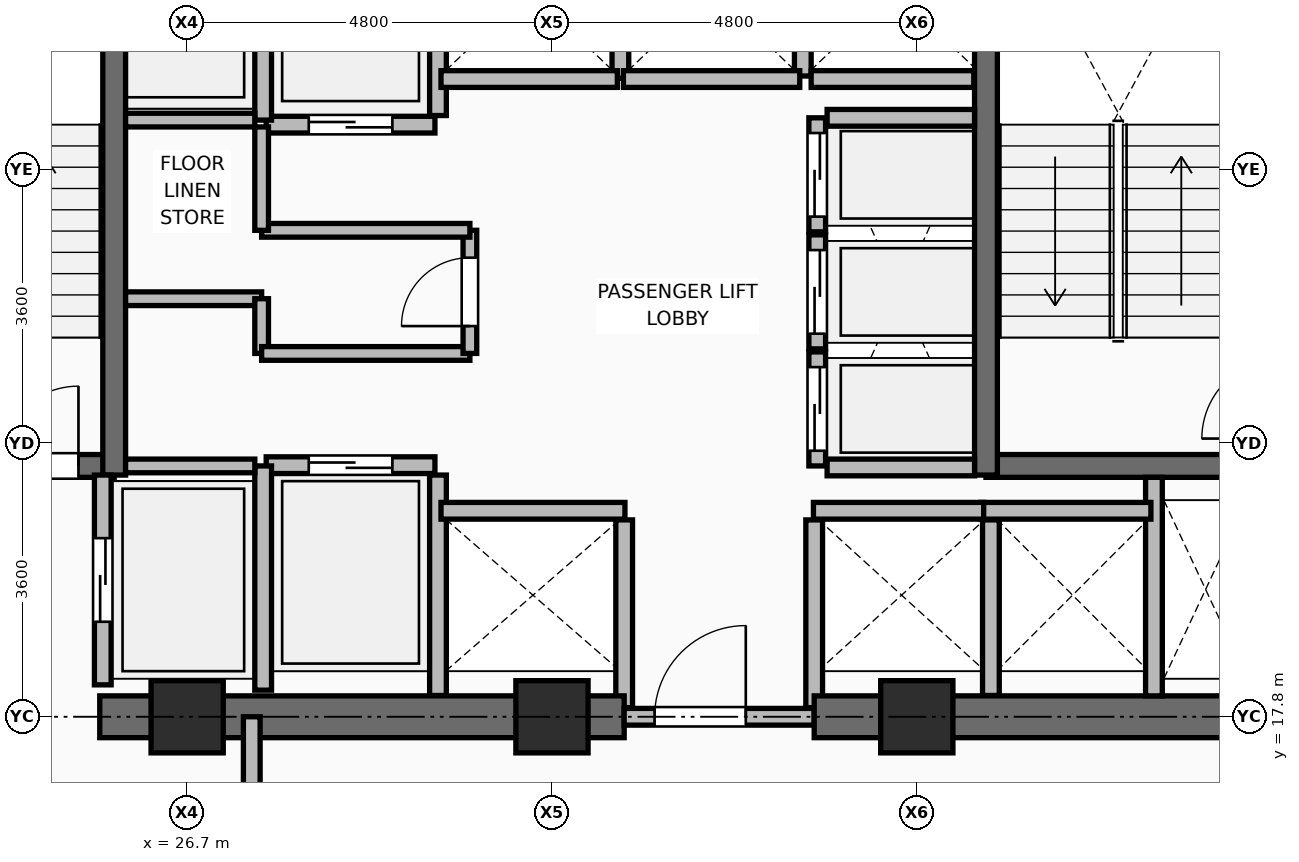
"""IFC4 building model, lengths in metres.
Left out: names, types, materials, properties, quantities, classifications, styles, units other than length and angle.
Written with IfcOpenShell. Run it as: python <this file> out.ifc"""

import sys

from ifc_helpers import new_model, si_unit, direction, frame, frame_2d, origin, origin_2d, place, context, subcontext, project, spatial, rectangle, extrude, element, fill, save


model = new_model("IFC4")
c1 = context("Model", 3, precision=1e-05, world=origin(), true_north=direction((0.0, 1.0)))
c2 = subcontext(c1, "Body", "Model", "MODEL_VIEW")
j1 = project(units=[si_unit("LENGTHUNIT", "METRE"), si_unit("PLANEANGLEUNIT", "RADIAN")], contexts=[c1])
p1 = place(None, origin())
s1 = spatial("IfcSite", under=j1, at=p1, CompositionType="ELEMENT")
p2 = place(p1, origin())
s2 = spatial("IfcBuilding", under=s1, at=p2, CompositionType="ELEMENT")
p3 = place(p2, frame((0.0, 0.0, 149.7)))
s3 = spatial("IfcBuildingStorey", under=s2, at=p3, CompositionType="ELEMENT", Elevation=149.7)
for number, where, z_axis, x_axis in (
    (1, (26.7, 17.8, 0.0), (0.0, 0.0, 1.0), (1.0, 0.0, 0.0)),
    (2, (31.5, 17.8, 0.0), (0.0, 0.0, 1.0), (1.0, 0.0, 0.0)),
    (3, (36.3, 17.8, 0.0), (0.0, 0.0, 1.0), (1.0, 0.0, 0.0)),
):
    element("IfcColumn", number, at=place(p3, frame(where, z_axis=z_axis, x_axis=x_axis)), inside=s3, PredefinedType="COLUMN", context=c2, shape_type="SweptSolid", body=[
        extrude(rectangle(XDim=0.95, YDim=0.95, at=origin_2d()), origin(), (0.0, 0.0, 1.0), 3.75),
    ])
p4 = place(p3, frame((30.0, 18.08, 0.0), z_axis=(0.0, 0.0, 1.0), x_axis=(0.0, 1.0, 0.0)))
e4 = element("IfcWall", 4, at=p4, inside=s3, PredefinedType="PARTITIONING", context=c2, shape_type="SweptSolid", body=[
    extrude(rectangle(XDim=2.9, YDim=0.22, at=frame_2d((1.45, 0.0))), origin(), (0.0, 0.0, 1.0), 3.545),
])
for number, where, z_axis, x_axis in (
    (5, (32.45, 17.92, 0.0), (0.0, 0.0, 1.0), (0.0, 1.0, 0.0)),
    (6, (34.95, 17.92, 0.0), (0.0, 0.0, 1.0), (0.0, 1.0, 0.0)),
):
    element("IfcWall", number, at=place(p3, frame(where, z_axis=z_axis, x_axis=x_axis)), inside=s3, PredefinedType="PARTITIONING", context=c2, shape_type="SweptSolid", body=[
        extrude(rectangle(XDim=2.47, YDim=0.22, at=frame_2d((1.235, 0.0))), origin(), (0.0, 0.0, 1.0), 3.006),
    ])
p5 = place(p3, frame((37.275, 18.08, 0.0), z_axis=(0.0, 0.0, 1.0), x_axis=(0.0, 1.0, 0.0)))
e7 = element("IfcWall", 7, at=p5, inside=s3, PredefinedType="PARTITIONING", context=c2, shape_type="SweptSolid", body=[
    extrude(rectangle(XDim=2.31, YDim=0.22, at=frame_2d((1.155, 0.0))), origin(), (0.0, 0.0, 1.0), 3.545),
])
p6 = place(p3, frame((30.0, 25.71, 0.0), z_axis=(0.0, 0.0, 1.0), x_axis=(0.0, 1.0, 0.0)))
e8 = element("IfcWall", 8, at=p6, inside=s3, PredefinedType="PARTITIONING", context=c2, shape_type="SweptSolid", body=[
    extrude(rectangle(XDim=2.73, YDim=0.22, at=frame_2d((1.365, 0.0))), origin(), (0.0, 0.0, 1.0), 3.545),
])
p7 = place(p3, frame((32.4, 26.2, 0.0), z_axis=(0.0, 0.0, 1.0), x_axis=(0.0, 1.0, 0.0)))
e9 = element("IfcWall", 9, at=p7, inside=s3, PredefinedType="PARTITIONING", context=c2, shape_type="SweptSolid", body=[
    extrude(rectangle(XDim=2.24, YDim=0.22, at=frame_2d((1.12, 0.0))), origin(), (0.0, 0.0, 1.0), 3.545),
])
p8 = place(p3, frame((34.8, 26.23, 0.0), z_axis=(0.0, 0.0, 1.0), x_axis=(0.0, 1.0, 0.0)))
e10 = element("IfcWall", 10, at=p8, inside=s3, PredefinedType="PARTITIONING", context=c2, shape_type="SweptSolid", body=[
    extrude(rectangle(XDim=2.21, YDim=0.22, at=frame_2d((1.105, 0.0))), origin(), (0.0, 0.0, 1.0), 3.545),
])
p9 = place(p3, frame((34.91, 26.19, 0.0), z_axis=(0.0, 0.0, 1.0), x_axis=(1.0, 0.0, 0.0)))
e11 = element("IfcWall", 11, at=p9, inside=s3, PredefinedType="PARTITIONING", context=c2, shape_type="SweptSolid", body=[
    extrude(rectangle(XDim=2.14, YDim=0.22, at=frame_2d((1.07, 0.0))), origin(), (0.0, 0.0, 1.0), 3.545),
])
p10 = place(p3, frame((25.55, 17.8, 0.0), z_axis=(0.0, 0.0, 1.0), x_axis=(1.0, 0.0, 0.0)))
e12 = element("IfcWall", 12, at=p10, inside=s3, PredefinedType="SHEAR", context=c2, shape_type="SweptSolid", body=[
    extrude(rectangle(XDim=6.9, YDim=0.55, at=frame_2d((3.45, 0.0))), origin(), (0.0, 0.0, 1.0), 3.57),
])
p11 = place(p3, frame((32.45, 17.8, 0.0), z_axis=(0.0, 0.0, 1.0), x_axis=(1.0, 0.0, 0.0)))
e13 = element("IfcWall", 13, at=p11, inside=s3, PredefinedType="PARTITIONING", context=c2, shape_type="SweptSolid", body=[
    extrude(rectangle(XDim=2.5, YDim=0.22, at=frame_2d((1.25, 0.0))), origin(), (0.0, 0.0, 1.0), 3.006),
])
p12 = place(p11, frame((0.4, 0.0, 0.0)))
e14 = element("IfcOpeningElement", 14, at=p12, cuts=e13, PredefinedType="OPENING", context=c2, shape_type="SweptSolid", body=[
    extrude(rectangle(XDim=1.2, YDim=2.1, at=frame_2d((0.6, 1.05))), frame((0.0, 0.12, 0.0), z_axis=(0.0, -1.0, 0.0), x_axis=(1.0, 0.0, 0.0)), (0.0, 0.0, 1.0), 0.24),
])
p13 = place(p3, frame((34.95, 17.8, 0.0), z_axis=(0.0, 0.0, 1.0), x_axis=(1.0, 0.0, 0.0)))
e15 = element("IfcWall", 15, at=p13, inside=s3, PredefinedType="SHEAR", context=c2, shape_type="SweptSolid", body=[
    extrude(rectangle(XDim=6.425, YDim=0.55, at=frame_2d((3.212, 0.0))), origin(), (0.0, 0.0, 1.0), 3.57),
])
p14 = place(p3, frame((22.175, 21.1, 0.0), z_axis=(0.0, 0.0, 1.0), x_axis=(1.0, 0.0, 0.0)))
e16 = element("IfcWall", 16, at=p14, inside=s3, PredefinedType="SHEAR", context=c2, shape_type="SweptSolid", body=[
    extrude(rectangle(XDim=3.565, YDim=0.3, at=frame_2d((1.782, 0.0))), origin(), (0.0, 0.0, 1.0), 3.57),
])
p15 = place(p14, frame((2.045, 0.0, 0.0)))
e17 = element("IfcOpeningElement", 17, at=p15, cuts=e16, PredefinedType="OPENING", context=c2, shape_type="SweptSolid", body=[
    extrude(rectangle(XDim=1.05, YDim=2.1, at=frame_2d((0.525, 1.05))), frame((0.0, 0.16, 0.0), z_axis=(0.0, -1.0, 0.0), x_axis=(1.0, 0.0, 0.0)), (0.0, 0.0, 1.0), 0.32),
])
p16 = place(p3, frame((25.74, 20.98, 0.0), z_axis=(0.0, 0.0, 1.0), x_axis=(0.0, 1.0, 0.0)))
e18 = element("IfcWall", 18, at=p16, inside=s3, PredefinedType="SHEAR", context=c2, shape_type="SweptSolid", body=[
    extrude(rectangle(XDim=7.99, YDim=0.3, at=frame_2d((3.995, 0.0))), origin(), (0.0, 0.0, 1.0), 3.57),
])
p17 = place(p3, frame((37.21, 21.1, 0.0), z_axis=(0.0, 0.0, 1.0), x_axis=(1.0, 0.0, 0.0)))
e19 = element("IfcWall", 19, at=p17, inside=s3, PredefinedType="SHEAR", context=c2, shape_type="SweptSolid", body=[
    extrude(rectangle(XDim=3.615, YDim=0.3, at=frame_2d((1.808, 0.0))), origin(), (0.0, 0.0, 1.0), 3.57),
])
p18 = place(p3, frame((37.21, 20.98, 0.0), z_axis=(0.0, 0.0, 1.0), x_axis=(0.0, 1.0, 0.0)))
e20 = element("IfcWall", 20, at=p18, inside=s3, PredefinedType="SHEAR", context=c2, shape_type="SweptSolid", body=[
    extrude(rectangle(XDim=7.99, YDim=0.3, at=frame_2d((3.995, 0.0))), origin(), (0.0, 0.0, 1.0), 3.57),
])
p19 = place(p3, frame((39.42, 18.075, 0.0), z_axis=(0.0, 0.0, 1.0), x_axis=(0.0, 1.0, 0.0)))
e21 = element("IfcWall", 21, at=p19, inside=s3, PredefinedType="PARTITIONING", context=c2, shape_type="SweptSolid", body=[
    extrude(rectangle(XDim=2.875, YDim=0.22, at=frame_2d((1.438, 0.0))), origin(), (0.0, 0.0, 1.0), 3.55),
])
p20 = place(p3, frame((25.59, 18.22, 0.0), z_axis=(0.0, 0.0, 1.0), x_axis=(0.0, 1.0, 0.0)))
e22 = element("IfcWall", 22, at=p20, inside=s3, PredefinedType="PARTITIONING", context=c2, shape_type="SweptSolid", body=[
    extrude(rectangle(XDim=2.76, YDim=0.22, at=frame_2d((1.38, 0.0))), origin(), (0.0, 0.0, 1.0), 3.55),
])
p21 = place(p20, frame((0.83, 0.0, 0.0)))
e23 = element("IfcOpeningElement", 23, at=p21, cuts=e22, PredefinedType="OPENING", context=c2, shape_type="SweptSolid", body=[
    extrude(rectangle(XDim=1.1, YDim=2.2, at=frame_2d((0.55, 1.1))), frame((0.0, 0.12, 0.0), z_axis=(0.0, -1.0, 0.0), x_axis=(1.0, 0.0, 0.0)), (0.0, 0.0, 1.0), 0.24),
])
p22 = place(p3, frame((27.74, 21.11, 0.0), z_axis=(0.0, 0.0, 1.0), x_axis=(1.0, 0.0, 0.0)))
e24 = element("IfcWall", 24, at=p22, inside=s3, PredefinedType="PARTITIONING", context=c2, shape_type="SweptSolid", body=[
    extrude(rectangle(XDim=2.22, YDim=0.22, at=frame_2d((1.11, 0.0))), origin(), (0.0, 0.0, 1.0), 3.55),
])
p23 = place(p22, frame((0.56, 0.0, 0.0)))
e25 = element("IfcOpeningElement", 25, at=p23, cuts=e24, PredefinedType="OPENING", context=c2, shape_type="SweptSolid", body=[
    extrude(rectangle(XDim=1.1, YDim=2.2, at=frame_2d((0.55, 1.1))), frame((0.0, 0.12, 0.0), z_axis=(0.0, -1.0, 0.0), x_axis=(1.0, 0.0, 0.0)), (0.0, 0.0, 1.0), 0.24),
])
p24 = place(p3, frame((27.74, 25.59, 0.0), z_axis=(0.0, 0.0, 1.0), x_axis=(1.0, 0.0, 0.0)))
e26 = element("IfcWall", 26, at=p24, inside=s3, PredefinedType="PARTITIONING", context=c2, shape_type="SweptSolid", body=[
    extrude(rectangle(XDim=2.22, YDim=0.22, at=frame_2d((1.11, 0.0))), origin(), (0.0, 0.0, 1.0), 3.55),
])
p25 = place(p24, frame((0.56, 0.0, 0.0)))
e27 = element("IfcOpeningElement", 27, at=p25, cuts=e26, PredefinedType="OPENING", context=c2, shape_type="SweptSolid", body=[
    extrude(rectangle(XDim=1.1, YDim=2.2, at=frame_2d((0.55, 1.1))), frame((0.0, 0.12, 0.0), z_axis=(0.0, -1.0, 0.0), x_axis=(1.0, 0.0, 0.0)), (0.0, 0.0, 1.0), 0.24),
])
p26 = place(p3, frame((30.04, 20.51, 0.0), z_axis=(0.0, 0.0, 1.0), x_axis=(1.0, 0.0, 0.0)))
e28 = element("IfcWall", 28, at=p26, inside=s3, PredefinedType="PARTITIONING", context=c2, shape_type="SweptSolid", body=[
    extrude(rectangle(XDim=2.42, YDim=0.22, at=frame_2d((1.21, 0.0))), origin(), (0.0, 0.0, 1.0), 3.55),
])
for number, where, z_axis, x_axis in (
    (29, (37.14, 20.51, 0.0), (0.0, 0.0, 1.0), (1.0, 0.0, 0.0)),
    (30, (34.94, 20.51, 0.0), (0.0, 0.0, 1.0), (1.0, 0.0, 0.0)),
):
    element("IfcWall", number, at=place(p3, frame(where, z_axis=z_axis, x_axis=x_axis)), inside=s3, PredefinedType="PARTITIONING", context=c2, shape_type="SweptSolid", body=[
        extrude(rectangle(XDim=2.24, YDim=0.22, at=frame_2d((1.12, 0.0))), origin(), (0.0, 0.0, 1.0), 3.55),
    ])
for number, where, z_axis, x_axis in (
    (31, (30.04, 26.19, 0.0), (0.0, 0.0, 1.0), (1.0, 0.0, 0.0)),
    (32, (32.44, 26.19, 0.0), (0.0, 0.0, 1.0), (1.0, 0.0, 0.0)),
):
    element("IfcWall", number, at=place(p3, frame(where, z_axis=z_axis, x_axis=x_axis)), inside=s3, PredefinedType="PARTITIONING", context=c2, shape_type="SweptSolid", body=[
        extrude(rectangle(XDim=2.32, YDim=0.22, at=frame_2d((1.16, 0.0))), origin(), (0.0, 0.0, 1.0), 3.55),
    ])
p27 = place(p3, frame((34.99, 21.1, 0.0), z_axis=(0.0, 0.0, 1.0), x_axis=(0.0, 1.0, 0.0)))
e33 = element("IfcWall", 33, at=p27, inside=s3, PredefinedType="PARTITIONING", context=c2, shape_type="SweptSolid", body=[
    extrude(rectangle(XDim=1.5, YDim=0.22, at=frame_2d((0.75, 0.0))), origin(), (0.0, 0.0, 1.0), 3.55),
])
p28 = place(p27, frame((0.2, 0.0, 0.0)))
e34 = element("IfcOpeningElement", 34, at=p28, cuts=e33, PredefinedType="OPENING", context=c2, shape_type="SweptSolid", body=[
    extrude(rectangle(XDim=1.1, YDim=2.2, at=frame_2d((0.55, 1.1))), frame((0.0, 0.12, 0.0), z_axis=(0.0, -1.0, 0.0), x_axis=(1.0, 0.0, 0.0)), (0.0, 0.0, 1.0), 0.24),
])
p29 = place(p3, frame((34.99, 22.64, 0.0), z_axis=(0.0, 0.0, 1.0), x_axis=(0.0, 1.0, 0.0)))
e35 = element("IfcWall", 35, at=p29, inside=s3, PredefinedType="PARTITIONING", context=c2, shape_type="SweptSolid", body=[
    extrude(rectangle(XDim=1.5, YDim=0.22, at=frame_2d((0.75, 0.0))), origin(), (0.0, 0.0, 1.0), 3.55),
])
p30 = place(p29, frame((0.2, 0.0, 0.0)))
e36 = element("IfcOpeningElement", 36, at=p30, cuts=e35, PredefinedType="OPENING", context=c2, shape_type="SweptSolid", body=[
    extrude(rectangle(XDim=1.1, YDim=2.2, at=frame_2d((0.55, 1.1))), frame((0.0, 0.12, 0.0), z_axis=(0.0, -1.0, 0.0), x_axis=(1.0, 0.0, 0.0)), (0.0, 0.0, 1.0), 0.24),
])
p31 = place(p3, frame((34.99, 24.18, 0.0), z_axis=(0.0, 0.0, 1.0), x_axis=(0.0, 1.0, 0.0)))
e37 = element("IfcWall", 37, at=p31, inside=s3, PredefinedType="PARTITIONING", context=c2, shape_type="SweptSolid", body=[
    extrude(rectangle(XDim=1.5, YDim=0.22, at=frame_2d((0.75, 0.0))), origin(), (0.0, 0.0, 1.0), 3.55),
])
p32 = place(p31, frame((0.2, 0.0, 0.0)))
e38 = element("IfcOpeningElement", 38, at=p32, cuts=e37, PredefinedType="OPENING", context=c2, shape_type="SweptSolid", body=[
    extrude(rectangle(XDim=1.1, YDim=2.2, at=frame_2d((0.55, 1.1))), frame((0.0, 0.12, 0.0), z_axis=(0.0, -1.0, 0.0), x_axis=(1.0, 0.0, 0.0)), (0.0, 0.0, 1.0), 0.24),
])
p33 = place(p3, frame((27.7, 18.15, 0.0), z_axis=(0.0, 0.0, 1.0), x_axis=(0.0, 1.0, 0.0)))
e39 = element("IfcWall", 39, at=p33, inside=s3, PredefinedType="PARTITIONING", context=c2, shape_type="SweptSolid", body=[
    extrude(rectangle(XDim=2.95, YDim=0.22, at=frame_2d((1.475, 0.0))), origin(), (0.0, 0.0, 1.0), 3.55),
])
p34 = place(p3, frame((27.7, 25.65, 0.0), z_axis=(0.0, 0.0, 1.0), x_axis=(0.0, 1.0, 0.0)))
e40 = element("IfcWall", 40, at=p34, inside=s3, PredefinedType="PARTITIONING", context=c2, shape_type="SweptSolid", body=[
    extrude(rectangle(XDim=3.0, YDim=0.22, at=frame_2d((1.5, 0.0))), origin(), (0.0, 0.0, 1.0), 3.55),
])
for number, where, z_axis, x_axis in (
    (41, (35.12, 21.08, 0.0), (0.0, 0.0, 1.0), (1.0, 0.0, 0.0)),
    (42, (35.12, 25.68, 0.0), (0.0, 0.0, 1.0), (1.0, 0.0, 0.0)),
):
    element("IfcWall", number, at=place(p3, frame(where, z_axis=z_axis, x_axis=x_axis)), inside=s3, PredefinedType="PARTITIONING", context=c2, shape_type="SweptSolid", body=[
        extrude(rectangle(XDim=1.94, YDim=0.22, at=frame_2d((0.97, 0.0))), origin(), (0.0, 0.0, 1.0), 3.55),
    ])
for number, where, z_axis, x_axis in (
    (43, (25.89, 21.1, 0.0), (0.0, 0.0, 1.0), (1.0, 0.0, 0.0)),
    (44, (25.89, 25.65, 0.0), (0.0, 0.0, 1.0), (1.0, 0.0, 0.0)),
):
    element("IfcWall", number, at=place(p3, frame(where, z_axis=z_axis, x_axis=x_axis)), inside=s3, PredefinedType="PARTITIONING", context=c2, shape_type="SweptSolid", body=[
        extrude(rectangle(XDim=1.7, YDim=0.18, at=frame_2d((0.85, 0.0))), origin(), (0.0, 0.0, 1.0), 3.55),
    ])
p35 = place(p3, frame((25.89, 23.3, 0.0), z_axis=(0.0, 0.0, 1.0), x_axis=(1.0, 0.0, 0.0)))
e45 = element("IfcWall", 45, at=p35, inside=s3, PredefinedType="PARTITIONING", context=c2, shape_type="SweptSolid", body=[
    extrude(rectangle(XDim=1.79, YDim=0.18, at=frame_2d((0.895, 0.0))), origin(), (0.0, 0.0, 1.0), 3.55),
])
p36 = place(p3, frame((27.68, 22.58, 0.0), z_axis=(0.0, 0.0, 1.0), x_axis=(0.0, 1.0, 0.0)))
e46 = element("IfcWall", 46, at=p36, inside=s3, PredefinedType="PARTITIONING", context=c2, shape_type="SweptSolid", body=[
    extrude(rectangle(XDim=0.72, YDim=0.18, at=frame_2d((0.36, 0.0))), origin(), (0.0, 0.0, 1.0), 3.55),
])
p37 = place(p3, frame((27.68, 22.58, 0.0), z_axis=(0.0, 0.0, 1.0), x_axis=(1.0, 0.0, 0.0)))
e47 = element("IfcWall", 47, at=p37, inside=s3, PredefinedType="PARTITIONING", context=c2, shape_type="SweptSolid", body=[
    extrude(rectangle(XDim=2.74, YDim=0.18, at=frame_2d((1.37, 0.0))), origin(), (0.0, 0.0, 1.0), 3.55),
])
p38 = place(p3, frame((30.42, 22.58, 0.0), z_axis=(0.0, 0.0, 1.0), x_axis=(0.0, 1.0, 0.0)))
e48 = element("IfcWall", 48, at=p38, inside=s3, PredefinedType="PARTITIONING", context=c2, shape_type="SweptSolid", body=[
    extrude(rectangle(XDim=1.62, YDim=0.18, at=frame_2d((0.81, 0.0))), origin(), (0.0, 0.0, 1.0), 3.55),
])
p39 = place(p38, frame((0.36, 0.0, 0.0)))
e49 = element("IfcOpeningElement", 49, at=p39, cuts=e48, PredefinedType="OPENING", context=c2, shape_type="SweptSolid", body=[
    extrude(rectangle(XDim=0.9, YDim=2.1, at=frame_2d((0.45, 1.05))), frame((0.0, 0.1, 0.0), z_axis=(0.0, -1.0, 0.0), x_axis=(1.0, 0.0, 0.0)), (0.0, 0.0, 1.0), 0.2),
])
p40 = place(p3, frame((27.68, 24.2, 0.0), z_axis=(0.0, 0.0, 1.0), x_axis=(1.0, 0.0, 0.0)))
e50 = element("IfcWall", 50, at=p40, inside=s3, PredefinedType="PARTITIONING", context=c2, shape_type="SweptSolid", body=[
    extrude(rectangle(XDim=2.74, YDim=0.18, at=frame_2d((1.37, 0.0))), origin(), (0.0, 0.0, 1.0), 3.55),
])
p41 = place(p3, frame((27.68, 24.2, 0.0), z_axis=(0.0, 0.0, 1.0), x_axis=(0.0, 1.0, 0.0)))
e51 = element("IfcWall", 51, at=p41, inside=s3, PredefinedType="PARTITIONING", context=c2, shape_type="SweptSolid", body=[
    extrude(rectangle(XDim=1.36, YDim=0.18, at=frame_2d((0.68, 0.0))), origin(), (0.0, 0.0, 1.0), 3.55),
])
p42 = place(p3, frame((27.55, 14.35, 0.0), z_axis=(0.0, 0.0, 1.0), x_axis=(0.0, 1.0, 0.0)))
e52 = element("IfcWall", 52, at=p42, inside=s3, PredefinedType="PARTITIONING", context=c2, shape_type="SweptSolid", body=[
    extrude(rectangle(XDim=3.45, YDim=0.22, at=frame_2d((1.725, 0.0))), origin(), (0.0, 0.0, 1.0), 3.006),
])
p43 = place(p42, frame((1.175, 0.0, 0.0)))
e53 = element("IfcOpeningElement", 53, at=p43, cuts=e52, PredefinedType="OPENING", context=c2, shape_type="SweptSolid", body=[
    extrude(rectangle(XDim=1.1, YDim=2.1, at=frame_2d((0.55, 1.05))), frame((0.0, 0.12, 0.0), z_axis=(0.0, -1.0, 0.0), x_axis=(1.0, 0.0, 0.0)), (0.0, 0.0, 1.0), 0.24),
])
p44 = place(p12, origin())
e54 = element("IfcDoor", 54, at=p44, inside=s3, OperationType="SINGLE_SWING_RIGHT", PredefinedType="DOOR", context=c2, shape_type="SweptSolid", body=[
    extrude(rectangle(XDim=1.2, YDim=2.1, at=frame_2d((0.6, 1.05))), frame((0.0, 0.025, 0.0), z_axis=(0.0, -1.0, 0.0), x_axis=(1.0, 0.0, 0.0)), (0.0, 0.0, 1.0), 0.05),
])
fill(e14, e54)
p45 = place(p15, origin())
e55 = element("IfcDoor", 55, at=p45, inside=s3, OperationType="SINGLE_SWING_RIGHT", PredefinedType="DOOR", context=c2, shape_type="SweptSolid", body=[
    extrude(rectangle(XDim=1.05, YDim=2.1, at=frame_2d((0.525, 1.05))), frame((0.0, 0.025, 0.0), z_axis=(0.0, -1.0, 0.0), x_axis=(1.0, 0.0, 0.0)), (0.0, 0.0, 1.0), 0.05),
])
fill(e17, e55)
p46 = place(p21, origin())
e56 = element("IfcDoor", 56, at=p46, inside=s3, OperationType="DOUBLE_DOOR_SLIDING", PredefinedType="DOOR", context=c2, shape_type="SweptSolid", body=[
    extrude(rectangle(XDim=1.1, YDim=2.2, at=frame_2d((0.55, 1.1))), frame((0.0, 0.025, 0.0), z_axis=(0.0, -1.0, 0.0), x_axis=(1.0, 0.0, 0.0)), (0.0, 0.0, 1.0), 0.05),
])
fill(e23, e56)
p47 = place(p23, origin())
e57 = element("IfcDoor", 57, at=p47, inside=s3, OperationType="DOUBLE_DOOR_SLIDING", PredefinedType="DOOR", context=c2, shape_type="SweptSolid", body=[
    extrude(rectangle(XDim=1.1, YDim=2.2, at=frame_2d((0.55, 1.1))), frame((0.0, 0.025, 0.0), z_axis=(0.0, -1.0, 0.0), x_axis=(1.0, 0.0, 0.0)), (0.0, 0.0, 1.0), 0.05),
])
fill(e25, e57)
p48 = place(p25, frame((1.1, 0.0, 0.0), z_axis=(0.0, 0.0, 1.0), x_axis=(-1.0, 0.0, 0.0)))
e58 = element("IfcDoor", 58, at=p48, inside=s3, OperationType="DOUBLE_DOOR_SLIDING", PredefinedType="DOOR", context=c2, shape_type="SweptSolid", body=[
    extrude(rectangle(XDim=1.1, YDim=2.2, at=frame_2d((0.55, 1.1))), frame((0.0, 0.025, 0.0), z_axis=(0.0, -1.0, 0.0), x_axis=(1.0, 0.0, 0.0)), (0.0, 0.0, 1.0), 0.05),
])
fill(e27, e58)
p49 = place(p28, origin())
e59 = element("IfcDoor", 59, at=p49, inside=s3, OperationType="DOUBLE_DOOR_SLIDING", PredefinedType="DOOR", context=c2, shape_type="SweptSolid", body=[
    extrude(rectangle(XDim=1.1, YDim=2.2, at=frame_2d((0.55, 1.1))), frame((0.0, 0.025, 0.0), z_axis=(0.0, -1.0, 0.0), x_axis=(1.0, 0.0, 0.0)), (0.0, 0.0, 1.0), 0.05),
])
fill(e34, e59)
p50 = place(p30, origin())
e60 = element("IfcDoor", 60, at=p50, inside=s3, OperationType="DOUBLE_DOOR_SLIDING", PredefinedType="DOOR", context=c2, shape_type="SweptSolid", body=[
    extrude(rectangle(XDim=1.1, YDim=2.2, at=frame_2d((0.55, 1.1))), frame((0.0, 0.025, 0.0), z_axis=(0.0, -1.0, 0.0), x_axis=(1.0, 0.0, 0.0)), (0.0, 0.0, 1.0), 0.05),
])
fill(e36, e60)
p51 = place(p32, origin())
e61 = element("IfcDoor", 61, at=p51, inside=s3, OperationType="DOUBLE_DOOR_SLIDING", PredefinedType="DOOR", context=c2, shape_type="SweptSolid", body=[
    extrude(rectangle(XDim=1.1, YDim=2.2, at=frame_2d((0.55, 1.1))), frame((0.0, 0.025, 0.0), z_axis=(0.0, -1.0, 0.0), x_axis=(1.0, 0.0, 0.0)), (0.0, 0.0, 1.0), 0.05),
])
fill(e38, e61)
p52 = place(p39, origin())
e62 = element("IfcDoor", 62, at=p52, inside=s3, OperationType="SINGLE_SWING_LEFT", PredefinedType="DOOR", context=c2, shape_type="SweptSolid", body=[
    extrude(rectangle(XDim=0.9, YDim=2.1, at=frame_2d((0.45, 1.05))), frame((0.0, 0.025, 0.0), z_axis=(0.0, -1.0, 0.0), x_axis=(1.0, 0.0, 0.0)), (0.0, 0.0, 1.0), 0.05),
])
fill(e49, e62)
save(model, sys.argv[1])
